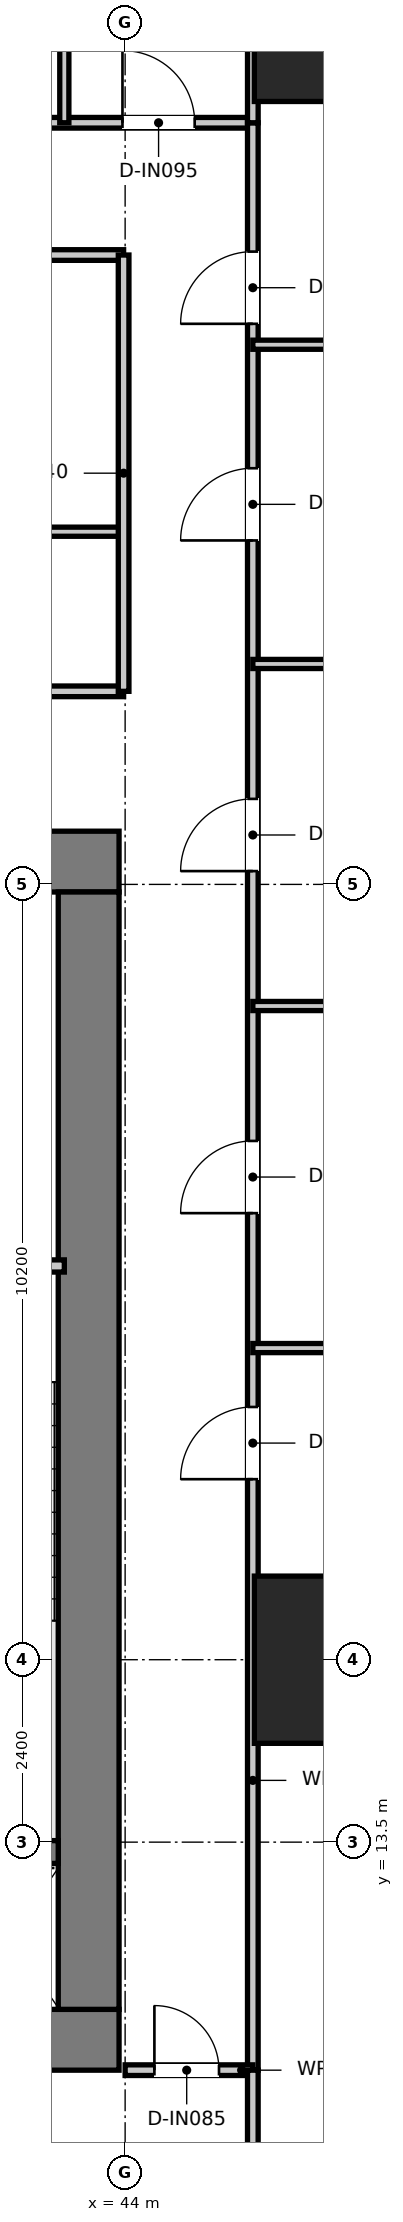
"""IFC4 building model, lengths in metres.
Left out: names, types, materials, properties, quantities, classifications, styles, units other than length and angle.
Written with IfcOpenShell. Run it as: python <this file> out.ifc"""

import sys

from ifc_helpers import new_model, si_unit, direction, frame, frame_2d, origin, origin_2d, place, context, subcontext, project, spatial, rectangle, extrude, source, transform, mapped, element, fill, save


model = new_model("IFC4")
c1 = context("Model", 3, precision=1e-05, world=origin(), true_north=direction((0.0, 1.0)))
c2 = subcontext(c1, "Body", "Model", "MODEL_VIEW")
j1 = project(units=[si_unit("LENGTHUNIT", "METRE"), si_unit("PLANEANGLEUNIT", "RADIAN")], contexts=[c1])
p1 = place(None, origin())
s1 = spatial("IfcSite", under=j1, at=p1, CompositionType="ELEMENT")
p2 = place(p1, origin())
s2 = spatial("IfcBuilding", under=s1, at=p2, CompositionType="ELEMENT")
p3 = place(p2, frame((0.0, 0.0, 76.35)))
s3 = spatial("IfcBuildingStorey", under=s2, at=p3, CompositionType="ELEMENT", Elevation=76.35)
p4 = place(p3, frame((28.08, 10.9, 0.0), z_axis=(0.0, 0.0, 1.0), x_axis=(1.0, 0.0, 0.0)))
e1 = element("IfcWall", 1, at=p4, inside=s3, PredefinedType="SHEAR", context=c2, shape_type="SweptSolid", body=[
    extrude(rectangle(XDim=15.84, YDim=0.8, at=frame_2d((7.92, 0.0))), origin(), (0.0, 0.0, 1.0), 3.95),
])
p5 = place(p3, frame((28.08, 26.4, 0.0), z_axis=(0.0, 0.0, 1.0), x_axis=(1.0, 0.0, 0.0)))
e2 = element("IfcWall", 2, at=p5, inside=s3, PredefinedType="SHEAR", context=c2, shape_type="SweptSolid", body=[
    extrude(rectangle(XDim=15.84, YDim=0.8, at=frame_2d((7.92, 0.0))), origin(), (0.0, 0.0, 1.0), 3.95),
])
p6 = place(p5, frame((7.22, 0.0, 0.0)))
e3 = element("IfcOpeningElement", 3, at=p6, cuts=e2, PredefinedType="OPENING", context=c2, shape_type="SweptSolid", body=[
    extrude(rectangle(XDim=1.4, YDim=2.2, at=frame_2d((0.7, 1.1))), frame((0.0, 0.41, 0.0), z_axis=(0.0, -1.0, 0.0), x_axis=(1.0, 0.0, 0.0)), (0.0, 0.0, 1.0), 0.82),
])
p7 = place(p5, frame((1.775, 0.0, 0.0)))
e4 = element("IfcOpeningElement", 4, at=p7, cuts=e2, PredefinedType="OPENING", context=c2, shape_type="SweptSolid", body=[
    extrude(rectangle(XDim=1.05, YDim=2.1, at=frame_2d((0.525, 1.05))), frame((0.0, 0.41, 0.0), z_axis=(0.0, -1.0, 0.0), x_axis=(1.0, 0.0, 0.0)), (0.0, 0.0, 1.0), 0.82),
])
p8 = place(p5, frame((13.015, 0.0, 0.0)))
e5 = element("IfcOpeningElement", 5, at=p8, cuts=e2, PredefinedType="OPENING", context=c2, shape_type="SweptSolid", body=[
    extrude(rectangle(XDim=1.05, YDim=2.1, at=frame_2d((0.525, 1.05))), frame((0.0, 0.41, 0.0), z_axis=(0.0, -1.0, 0.0), x_axis=(1.0, 0.0, 0.0)), (0.0, 0.0, 1.0), 0.82),
])
p9 = place(p3, frame((43.52, 11.3, 0.0), z_axis=(0.0, 0.0, 1.0), x_axis=(0.0, 1.0, 0.0)))
e6 = element("IfcWall", 6, at=p9, inside=s3, PredefinedType="SHEAR", context=c2, shape_type="SweptSolid", body=[
    extrude(rectangle(XDim=14.7, YDim=0.8, at=frame_2d((7.35, 0.0))), origin(), (0.0, 0.0, 1.0), 3.95),
])
p10 = place(p3, frame((40.02, 13.37, 0.0), z_axis=(0.0, 0.0, 1.0), x_axis=(1.0, 0.0, 0.0)))
e7 = element("IfcWall", 7, at=p10, inside=s3, PredefinedType="SHEAR", context=c2, shape_type="SweptSolid", body=[
    extrude(rectangle(XDim=3.1, YDim=0.3, at=frame_2d((1.55, 0.0))), origin(), (0.0, 0.0, 1.0), 3.95),
])
m1 = source(origin(), c2, "Body", "SweptSolid", [
    extrude(rectangle(XDim=2.2, YDim=2.2, at=origin_2d()), origin(), (0.0, 0.0, 1.0), 3.95),
])
for number, where, z_axis, x_axis in (
    (8, (46.8, 15.9, 0.0), (0.0, 0.0, 1.0), (1.0, 0.0, 0.0)),
    (9, (46.8, 37.5, 0.0), (0.0, 0.0, 1.0), (1.0, 0.0, 0.0)),
):
    element("IfcColumn", number, at=place(p3, frame(where, z_axis=z_axis, x_axis=x_axis)), inside=s3, PredefinedType="USERDEFINED", context=c2, shape_type="MappedRepresentation", body=[
        mapped(m1, transform((0.0, 0.0, 0.0), x_axis=(1.0, 0.0, 0.0), y_axis=(0.0, 1.0, 0.0), z_axis=(0.0, 0.0, 1.0), scale=1.0)),
    ])
p11 = place(p3, frame((40.04, 21.08, 0.0), z_axis=(0.0, 0.0, 1.0), x_axis=(1.0, 0.0, 0.0)))
e10 = element("IfcWall", 10, at=p11, inside=s3, PredefinedType="PARTITIONING", context=c2, shape_type="SweptSolid", body=[
    extrude(rectangle(XDim=3.16, YDim=0.16, at=frame_2d((1.58, 0.0))), origin(), (0.0, 0.0, 1.0), 3.59),
])
p12 = place(p11, frame((1.055, 0.0, 0.0)))
e11 = element("IfcOpeningElement", 11, at=p12, cuts=e10, PredefinedType="OPENING", context=c2, shape_type="SweptSolid", body=[
    extrude(rectangle(XDim=1.05, YDim=2.1, at=frame_2d((0.525, 1.05))), frame((0.0, 0.09, 0.0), z_axis=(0.0, -1.0, 0.0), x_axis=(1.0, 0.0, 0.0)), (0.0, 0.0, 1.0), 0.18),
])
p13 = place(p3, frame((28.02, 28.64, 0.0), z_axis=(0.0, 0.0, 1.0), x_axis=(1.0, 0.0, 0.0)))
e12 = element("IfcWall", 12, at=p13, inside=s3, PredefinedType="PARTITIONING", context=c2, shape_type="SweptSolid", body=[
    extrude(rectangle(XDim=15.96, YDim=0.14, at=frame_2d((7.98, 0.0))), origin(), (0.0, 0.0, 1.0), 3.0),
])
p14 = place(p13, frame((7.455, 0.0, 0.0)))
e13 = element("IfcOpeningElement", 13, at=p14, cuts=e12, PredefinedType="OPENING", context=c2, shape_type="SweptSolid", body=[
    extrude(rectangle(XDim=1.05, YDim=2.15, at=frame_2d((0.525, 1.075))), frame((0.0, 0.08, 0.0), z_axis=(0.0, -1.0, 0.0), x_axis=(1.0, 0.0, 0.0)), (0.0, 0.0, 1.0), 0.16),
])
p15 = place(p3, frame((28.02, 30.74, 0.0), z_axis=(0.0, 0.0, 1.0), x_axis=(1.0, 0.0, 0.0)))
e14 = element("IfcWall", 14, at=p15, inside=s3, PredefinedType="PARTITIONING", context=c2, shape_type="SweptSolid", body=[
    extrude(rectangle(XDim=15.96, YDim=0.12, at=frame_2d((7.98, 0.0))), origin(), (0.0, 0.0, 1.0), 3.0),
])
p16 = place(p3, frame((28.02, 34.38, 0.0), z_axis=(0.0, 0.0, 1.0), x_axis=(1.0, 0.0, 0.0)))
e15 = element("IfcWall", 15, at=p16, inside=s3, PredefinedType="PARTITIONING", context=c2, shape_type="SweptSolid", body=[
    extrude(rectangle(XDim=15.96, YDim=0.14, at=frame_2d((7.98, 0.0))), origin(), (0.0, 0.0, 1.0), 3.0),
])
p17 = place(p16, frame((1.13, 0.0, 0.0)))
e16 = element("IfcOpeningElement", 16, at=p17, cuts=e15, PredefinedType="OPENING", context=c2, shape_type="SweptSolid", body=[
    extrude(rectangle(XDim=0.9, YDim=2.1, at=frame_2d((0.45, 1.05))), frame((0.0, 0.08, 0.0), z_axis=(0.0, -1.0, 0.0), x_axis=(1.0, 0.0, 0.0)), (0.0, 0.0, 1.0), 0.16),
])
p18 = place(p16, frame((4.33, 0.0, 0.0)))
e17 = element("IfcOpeningElement", 17, at=p18, cuts=e15, PredefinedType="OPENING", context=c2, shape_type="SweptSolid", body=[
    extrude(rectangle(XDim=0.9, YDim=2.1, at=frame_2d((0.45, 1.05))), frame((0.0, 0.08, 0.0), z_axis=(0.0, -1.0, 0.0), x_axis=(1.0, 0.0, 0.0)), (0.0, 0.0, 1.0), 0.16),
])
p19 = place(p16, frame((7.355, 0.0, 0.0)))
e18 = element("IfcOpeningElement", 18, at=p19, cuts=e15, PredefinedType="OPENING", context=c2, shape_type="SweptSolid", body=[
    extrude(rectangle(XDim=0.95, YDim=2.1, at=frame_2d((0.475, 1.05))), frame((0.0, 0.08, 0.0), z_axis=(0.0, -1.0, 0.0), x_axis=(1.0, 0.0, 0.0)), (0.0, 0.0, 1.0), 0.16),
])
p20 = place(p16, frame((12.23, 0.0, 0.0)))
e19 = element("IfcOpeningElement", 19, at=p20, cuts=e15, PredefinedType="OPENING", context=c2, shape_type="SweptSolid", body=[
    extrude(rectangle(XDim=0.95, YDim=2.1, at=frame_2d((0.475, 1.05))), frame((0.0, 0.08, 0.0), z_axis=(0.0, -1.0, 0.0), x_axis=(1.0, 0.0, 0.0)), (0.0, 0.0, 1.0), 0.16),
])
p21 = place(p3, frame((43.98, 28.64, 0.0), z_axis=(0.0, 0.0, 1.0), x_axis=(0.0, 1.0, 0.0)))
e20 = element("IfcWall", 20, at=p21, inside=s3, PredefinedType="PARTITIONING", context=c2, shape_type="SweptSolid", body=[
    extrude(rectangle(XDim=5.74, YDim=0.14, at=frame_2d((2.87, 0.0))), origin(), (0.0, 0.0, 1.0), 3.14),
])
p22 = place(p3, frame((26.32, 36.12, 0.0), z_axis=(0.0, 0.0, 1.0), x_axis=(1.0, 0.0, 0.0)))
e21 = element("IfcWall", 21, at=p22, inside=s3, PredefinedType="PARTITIONING", context=c2, shape_type="SweptSolid", body=[
    extrude(rectangle(XDim=19.36, YDim=0.14, at=frame_2d((9.68, 0.0))), origin(), (0.0, 0.0, 1.0), 3.0),
])
p23 = place(p22, frame((1.265, 0.0, 0.0)))
e22 = element("IfcOpeningElement", 22, at=p23, cuts=e21, PredefinedType="OPENING", context=c2, shape_type="SweptSolid", body=[
    extrude(rectangle(XDim=0.95, YDim=2.1, at=frame_2d((0.475, 1.05))), frame((0.0, 0.08, 0.0), z_axis=(0.0, -1.0, 0.0), x_axis=(1.0, 0.0, 0.0)), (0.0, 0.0, 1.0), 0.16),
])
p24 = place(p22, frame((5.305, 0.0, 0.0)))
e23 = element("IfcOpeningElement", 23, at=p24, cuts=e21, PredefinedType="OPENING", context=c2, shape_type="SweptSolid", body=[
    extrude(rectangle(XDim=0.95, YDim=2.1, at=frame_2d((0.475, 1.05))), frame((0.0, 0.08, 0.0), z_axis=(0.0, -1.0, 0.0), x_axis=(1.0, 0.0, 0.0)), (0.0, 0.0, 1.0), 0.16),
])
p25 = place(p22, frame((9.905, 0.0, 0.0)))
e24 = element("IfcOpeningElement", 24, at=p25, cuts=e21, PredefinedType="OPENING", context=c2, shape_type="SweptSolid", body=[
    extrude(rectangle(XDim=0.95, YDim=2.1, at=frame_2d((0.475, 1.05))), frame((0.0, 0.08, 0.0), z_axis=(0.0, -1.0, 0.0), x_axis=(1.0, 0.0, 0.0)), (0.0, 0.0, 1.0), 0.16),
])
p26 = place(p22, frame((14.305, 0.0, 0.0)))
e25 = element("IfcOpeningElement", 25, at=p26, cuts=e21, PredefinedType="OPENING", context=c2, shape_type="SweptSolid", body=[
    extrude(rectangle(XDim=0.95, YDim=2.1, at=frame_2d((0.475, 1.05))), frame((0.0, 0.08, 0.0), z_axis=(0.0, -1.0, 0.0), x_axis=(1.0, 0.0, 0.0)), (0.0, 0.0, 1.0), 0.16),
])
p27 = place(p22, frame((17.645, 0.0, 0.0)))
e26 = element("IfcOpeningElement", 26, at=p27, cuts=e21, PredefinedType="OPENING", context=c2, shape_type="SweptSolid", body=[
    extrude(rectangle(XDim=0.95, YDim=2.1, at=frame_2d((0.475, 1.05))), frame((0.0, 0.08, 0.0), z_axis=(0.0, -1.0, 0.0), x_axis=(1.0, 0.0, 0.0)), (0.0, 0.0, 1.0), 0.16),
])
p28 = place(p3, frame((45.68, 10.5, 0.0), z_axis=(0.0, 0.0, 1.0), x_axis=(0.0, 1.0, 0.0)))
e27 = element("IfcWall", 27, at=p28, inside=s3, PredefinedType="PARTITIONING", context=c2, shape_type="SweptSolid", body=[
    extrude(rectangle(XDim=25.62, YDim=0.14, at=frame_2d((12.81, 0.0))), origin(), (0.0, 0.0, 1.0), 2.89),
])
p29 = place(p28, frame((7.775, 0.0, 0.0)))
e28 = element("IfcOpeningElement", 28, at=p29, cuts=e27, PredefinedType="OPENING", context=c2, shape_type="SweptSolid", body=[
    extrude(rectangle(XDim=0.95, YDim=2.1, at=frame_2d((0.475, 1.05))), frame((0.0, 0.08, 0.0), z_axis=(0.0, -1.0, 0.0), x_axis=(1.0, 0.0, 0.0)), (0.0, 0.0, 1.0), 0.16),
])
p30 = place(p28, frame((11.275, 0.0, 0.0)))
e29 = element("IfcOpeningElement", 29, at=p30, cuts=e27, PredefinedType="OPENING", context=c2, shape_type="SweptSolid", body=[
    extrude(rectangle(XDim=0.95, YDim=2.1, at=frame_2d((0.475, 1.05))), frame((0.0, 0.08, 0.0), z_axis=(0.0, -1.0, 0.0), x_axis=(1.0, 0.0, 0.0)), (0.0, 0.0, 1.0), 0.16),
])
p31 = place(p28, frame((15.775, 0.0, 0.0)))
e30 = element("IfcOpeningElement", 30, at=p31, cuts=e27, PredefinedType="OPENING", context=c2, shape_type="SweptSolid", body=[
    extrude(rectangle(XDim=0.95, YDim=2.1, at=frame_2d((0.475, 1.05))), frame((0.0, 0.08, 0.0), z_axis=(0.0, -1.0, 0.0), x_axis=(1.0, 0.0, 0.0)), (0.0, 0.0, 1.0), 0.16),
])
p32 = place(p28, frame((20.125, 0.0, 0.0)))
e31 = element("IfcOpeningElement", 31, at=p32, cuts=e27, PredefinedType="OPENING", context=c2, shape_type="SweptSolid", body=[
    extrude(rectangle(XDim=0.95, YDim=2.1, at=frame_2d((0.475, 1.05))), frame((0.0, 0.08, 0.0), z_axis=(0.0, -1.0, 0.0), x_axis=(1.0, 0.0, 0.0)), (0.0, 0.0, 1.0), 0.16),
])
p33 = place(p28, frame((22.975, 0.0, 0.0)))
e32 = element("IfcOpeningElement", 32, at=p33, cuts=e27, PredefinedType="OPENING", context=c2, shape_type="SweptSolid", body=[
    extrude(rectangle(XDim=0.95, YDim=2.1, at=frame_2d((0.475, 1.05))), frame((0.0, 0.08, 0.0), z_axis=(0.0, -1.0, 0.0), x_axis=(1.0, 0.0, 0.0)), (0.0, 0.0, 1.0), 0.16),
])
p34 = place(p3, frame((44.0, 10.5, 0.0), z_axis=(0.0, 0.0, 1.0), x_axis=(1.0, 0.0, 0.0)))
e33 = element("IfcWall", 33, at=p34, inside=s3, PredefinedType="PARTITIONING", context=c2, shape_type="SweptSolid", body=[
    extrude(rectangle(XDim=1.68, YDim=0.14, at=frame_2d((0.84, 0.0))), origin(), (0.0, 0.0, 1.0), 3.59),
])
p35 = place(p34, frame((0.385, 0.0, 0.0)))
e34 = element("IfcOpeningElement", 34, at=p35, cuts=e33, PredefinedType="OPENING", context=c2, shape_type="SweptSolid", body=[
    extrude(rectangle(XDim=0.85, YDim=2.1, at=frame_2d((0.425, 1.05))), frame((0.0, 0.08, 0.0), z_axis=(0.0, -1.0, 0.0), x_axis=(1.0, 0.0, 0.0)), (0.0, 0.0, 1.0), 0.16),
])
p36 = place(p3, frame((45.68, 36.12, 0.0), z_axis=(0.0, 0.0, 1.0), x_axis=(0.0, 1.0, 0.0)))
e35 = element("IfcWall", 35, at=p36, inside=s3, PredefinedType="PARTITIONING", context=c2, shape_type="SweptSolid", body=[
    extrude(rectangle(XDim=14.32, YDim=0.14, at=frame_2d((7.16, 0.0))), origin(), (0.0, 0.0, 1.0), 2.89),
])
p37 = place(p3, frame((45.68, 0.067, 0.0), z_axis=(0.0, 0.0, 1.0), x_axis=(0.0, 1.0, 0.0)))
e36 = element("IfcWall", 36, at=p37, inside=s3, PredefinedType="PARTITIONING", context=c2, shape_type="SweptSolid", body=[
    extrude(rectangle(XDim=10.433, YDim=0.14, at=frame_2d((5.217, 0.0))), origin(), (0.0, 0.0, 1.0), 3.59),
])
p38 = place(p3, frame((43.2, 36.12, 0.0), z_axis=(0.0, 0.0, 1.0), x_axis=(0.0, 1.0, 0.0)))
e37 = element("IfcWall", 37, at=p38, inside=s3, PredefinedType="PARTITIONING", context=c2, shape_type="SweptSolid", body=[
    extrude(rectangle(XDim=14.69, YDim=0.12, at=frame_2d((7.345, 0.0))), origin(), (0.0, 0.0, 1.0), 2.89),
])
p39 = place(p3, frame((45.68, 20.0, 0.0), z_axis=(0.0, 0.0, 1.0), x_axis=(1.0, 0.0, 0.0)))
e38 = element("IfcWall", 38, at=p39, inside=s3, PredefinedType="PARTITIONING", context=c2, shape_type="SweptSolid", body=[
    extrude(rectangle(XDim=14.505, YDim=0.12, at=frame_2d((7.253, 0.0))), origin(), (0.0, 0.0, 1.0), 2.89),
])
p40 = place(p3, frame((45.68, 24.5, 0.0), z_axis=(0.0, 0.0, 1.0), x_axis=(1.0, 0.0, 0.0)))
e39 = element("IfcWall", 39, at=p40, inside=s3, PredefinedType="PARTITIONING", context=c2, shape_type="SweptSolid", body=[
    extrude(rectangle(XDim=15.178, YDim=0.12, at=frame_2d((7.589, 0.0))), origin(), (0.0, 0.0, 1.0), 2.89),
])
p41 = place(p3, frame((45.68, 29.0, 0.0), z_axis=(0.0, 0.0, 1.0), x_axis=(1.0, 0.0, 0.0)))
e40 = element("IfcWall", 40, at=p41, inside=s3, PredefinedType="PARTITIONING", context=c2, shape_type="SweptSolid", body=[
    extrude(rectangle(XDim=15.851, YDim=0.12, at=frame_2d((7.925, 0.0))), origin(), (0.0, 0.0, 1.0), 2.89),
])
p42 = place(p3, frame((45.68, 33.2, 0.0), z_axis=(0.0, 0.0, 1.0), x_axis=(1.0, 0.0, 0.0)))
e41 = element("IfcWall", 41, at=p42, inside=s3, PredefinedType="PARTITIONING", context=c2, shape_type="SweptSolid", body=[
    extrude(rectangle(XDim=16.478, YDim=0.12, at=frame_2d((8.239, 0.0))), origin(), (0.0, 0.0, 1.0), 2.89),
])
p43 = place(p27, origin())
e42 = element("IfcDoor", 42, at=p43, inside=s3, OperationType="SINGLE_SWING_LEFT", PredefinedType="DOOR", context=c2, shape_type="SweptSolid", body=[
    extrude(rectangle(XDim=0.95, YDim=2.1, at=frame_2d((0.475, 1.05))), frame((0.0, 0.025, 0.0), z_axis=(0.0, -1.0, 0.0), x_axis=(1.0, 0.0, 0.0)), (0.0, 0.0, 1.0), 0.05),
])
fill(e26, e42)
p44 = place(p29, origin())
e43 = element("IfcDoor", 43, at=p44, inside=s3, OperationType="SINGLE_SWING_LEFT", PredefinedType="DOOR", context=c2, shape_type="SweptSolid", body=[
    extrude(rectangle(XDim=0.95, YDim=2.1, at=frame_2d((0.475, 1.05))), frame((0.0, 0.025, 0.0), z_axis=(0.0, -1.0, 0.0), x_axis=(1.0, 0.0, 0.0)), (0.0, 0.0, 1.0), 0.05),
])
fill(e28, e43)
p45 = place(p30, origin())
e44 = element("IfcDoor", 44, at=p45, inside=s3, OperationType="SINGLE_SWING_LEFT", PredefinedType="DOOR", context=c2, shape_type="SweptSolid", body=[
    extrude(rectangle(XDim=0.95, YDim=2.1, at=frame_2d((0.475, 1.05))), frame((0.0, 0.025, 0.0), z_axis=(0.0, -1.0, 0.0), x_axis=(1.0, 0.0, 0.0)), (0.0, 0.0, 1.0), 0.05),
])
fill(e29, e44)
p46 = place(p31, origin())
e45 = element("IfcDoor", 45, at=p46, inside=s3, OperationType="SINGLE_SWING_LEFT", PredefinedType="DOOR", context=c2, shape_type="SweptSolid", body=[
    extrude(rectangle(XDim=0.95, YDim=2.1, at=frame_2d((0.475, 1.05))), frame((0.0, 0.025, 0.0), z_axis=(0.0, -1.0, 0.0), x_axis=(1.0, 0.0, 0.0)), (0.0, 0.0, 1.0), 0.05),
])
fill(e30, e45)
p47 = place(p32, origin())
e46 = element("IfcDoor", 46, at=p47, inside=s3, OperationType="SINGLE_SWING_LEFT", PredefinedType="DOOR", context=c2, shape_type="SweptSolid", body=[
    extrude(rectangle(XDim=0.95, YDim=2.1, at=frame_2d((0.475, 1.05))), frame((0.0, 0.025, 0.0), z_axis=(0.0, -1.0, 0.0), x_axis=(1.0, 0.0, 0.0)), (0.0, 0.0, 1.0), 0.05),
])
fill(e31, e46)
p48 = place(p33, origin())
e47 = element("IfcDoor", 47, at=p48, inside=s3, OperationType="SINGLE_SWING_LEFT", PredefinedType="DOOR", context=c2, shape_type="SweptSolid", body=[
    extrude(rectangle(XDim=0.95, YDim=2.1, at=frame_2d((0.475, 1.05))), frame((0.0, 0.025, 0.0), z_axis=(0.0, -1.0, 0.0), x_axis=(1.0, 0.0, 0.0)), (0.0, 0.0, 1.0), 0.05),
])
fill(e32, e47)
p49 = place(p35, origin())
e48 = element("IfcDoor", 48, at=p49, inside=s3, OperationType="SINGLE_SWING_LEFT", PredefinedType="DOOR", context=c2, shape_type="SweptSolid", body=[
    extrude(rectangle(XDim=0.85, YDim=2.1, at=frame_2d((0.425, 1.05))), frame((0.0, 0.025, 0.0), z_axis=(0.0, -1.0, 0.0), x_axis=(1.0, 0.0, 0.0)), (0.0, 0.0, 1.0), 0.05),
])
fill(e34, e48)
save(model, sys.argv[1])
